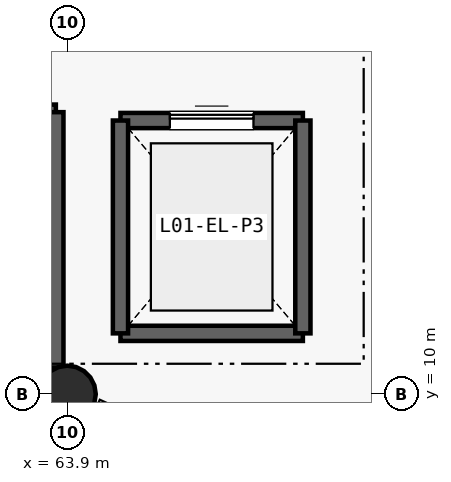
"""IFC4 building model, lengths in metres.
Left out: names, types, materials, properties, quantities, classifications, styles, units other than length and angle.
Written with IfcOpenShell. Run it as: python <this file> out.ifc"""

import sys

from ifc_helpers import new_model, si_unit, direction, frame, frame_2d, origin, origin_2d, place, context, subcontext, project, spatial, rectangle, circle, extrude, element, fill, save


model = new_model("IFC4")
c1 = context("Model", 3, precision=1e-05, world=origin(), true_north=direction((0.0, 1.0)))
c2 = subcontext(c1, "Body", "Model", "MODEL_VIEW")
j1 = project(units=[si_unit("LENGTHUNIT", "METRE"), si_unit("PLANEANGLEUNIT", "RADIAN")], contexts=[c1])
p1 = place(None, origin())
s1 = spatial("IfcSite", under=j1, at=p1, CompositionType="ELEMENT")
p2 = place(p1, origin())
s2 = spatial("IfcBuilding", under=s1, at=p2, CompositionType="ELEMENT")
p3 = place(p2, frame((0.0, 0.0, 4.2)))
s3 = spatial("IfcBuildingStorey", under=s2, at=p3, CompositionType="ELEMENT", Elevation=4.2)
p4 = place(p3, frame((63.9, 10.0, 0.0), z_axis=(0.0, 0.0, 1.0), x_axis=(1.0, 0.0, 0.0)))
e1 = element("IfcColumn", 1, at=p4, inside=s3, PredefinedType="COLUMN", context=c2, shape_type="SweptSolid", body=[
    extrude(circle(Radius=0.375, at=origin_2d()), origin(), (0.0, 0.0, 1.0), 4.2),
])
p5 = place(p3, frame((57.45, 10.35, 0.0), z_axis=(0.0, 0.0, 1.0), x_axis=(1.0, 0.0, 0.0)))
e2 = element("IfcWall", 2, at=p5, inside=s3, PredefinedType="SHEAR", context=c2, shape_type="SweptSolid", body=[
    extrude(rectangle(XDim=6.3, YDim=0.2, at=frame_2d((3.15, 0.0))), origin(), (0.0, 0.0, 1.0), 4.2),
])
p6 = place(p3, frame((57.45, 13.71, 0.0), z_axis=(0.0, 0.0, 1.0), x_axis=(1.0, 0.0, 0.0)))
e3 = element("IfcWall", 3, at=p6, inside=s3, PredefinedType="SHEAR", context=c2, shape_type="SweptSolid", body=[
    extrude(rectangle(XDim=6.3, YDim=0.2, at=frame_2d((3.15, 0.0))), origin(), (0.0, 0.0, 1.0), 4.2),
])
p7 = place(p6, frame((0.32, 0.0, 0.0)))
e4 = element("IfcOpeningElement", 4, at=p7, cuts=e3, PredefinedType="OPENING", context=c2, shape_type="SweptSolid", body=[
    extrude(rectangle(XDim=1.2, YDim=2.15, at=frame_2d((0.6, 1.075))), frame((0.0, 0.11, 0.0), z_axis=(0.0, -1.0, 0.0), x_axis=(1.0, 0.0, 0.0)), (0.0, 0.0, 1.0), 0.22),
])
p8 = place(p3, frame((63.75, 10.35, 0.0), z_axis=(0.0, 0.0, 1.0), x_axis=(0.0, 1.0, 0.0)))
e5 = element("IfcWall", 5, at=p8, inside=s3, PredefinedType="SHEAR", context=c2, shape_type="SweptSolid", body=[
    extrude(rectangle(XDim=3.36, YDim=0.2, at=frame_2d((1.68, 0.0))), origin(), (0.0, 0.0, 1.0), 4.2),
])
p9 = place(p3, frame((64.6, 10.8, 0.0), z_axis=(0.0, 0.0, 1.0), x_axis=(1.0, 0.0, 0.0)))
e6 = element("IfcWall", 6, at=p9, inside=s3, PredefinedType="SHEAR", context=c2, shape_type="SweptSolid", body=[
    extrude(rectangle(XDim=2.4, YDim=0.2, at=frame_2d((1.2, 0.0))), origin(), (0.0, 0.0, 1.0), 4.2),
])
p10 = place(p3, frame((64.6, 13.6, 0.0), z_axis=(0.0, 0.0, 1.0), x_axis=(1.0, 0.0, 0.0)))
e7 = element("IfcWall", 7, at=p10, inside=s3, PredefinedType="SHEAR", context=c2, shape_type="SweptSolid", body=[
    extrude(rectangle(XDim=2.4, YDim=0.2, at=frame_2d((1.2, 0.0))), origin(), (0.0, 0.0, 1.0), 4.2),
])
p11 = place(p10, frame((0.65, 0.0, 0.0)))
e8 = element("IfcOpeningElement", 8, at=p11, cuts=e7, PredefinedType="OPENING", context=c2, shape_type="SweptSolid", body=[
    extrude(rectangle(XDim=1.1, YDim=2.15, at=frame_2d((0.55, 1.075))), frame((0.0, 0.11, 0.0), z_axis=(0.0, -1.0, 0.0), x_axis=(1.0, 0.0, 0.0)), (0.0, 0.0, 1.0), 0.22),
])
for number, where, z_axis, x_axis in (
    (9, (64.6, 10.8, 0.0), (0.0, 0.0, 1.0), (0.0, 1.0, 0.0)),
    (10, (67.0, 10.8, 0.0), (0.0, 0.0, 1.0), (0.0, 1.0, 0.0)),
):
    element("IfcWall", number, at=place(p3, frame(where, z_axis=z_axis, x_axis=x_axis)), inside=s3, PredefinedType="SHEAR", context=c2, shape_type="SweptSolid", body=[
        extrude(rectangle(XDim=2.8, YDim=0.2, at=frame_2d((1.4, 0.0))), origin(), (0.0, 0.0, 1.0), 4.2),
    ])
p12 = place(p11, origin())
e11 = element("IfcDoor", 11, at=p12, inside=s3, OperationType="SLIDING_TO_LEFT", PredefinedType="DOOR", context=c2, shape_type="SweptSolid", body=[
    extrude(rectangle(XDim=1.1, YDim=2.15, at=frame_2d((0.55, 1.075))), frame((0.0, 0.025, 0.0), z_axis=(0.0, -1.0, 0.0), x_axis=(1.0, 0.0, 0.0)), (0.0, 0.0, 1.0), 0.05),
])
fill(e8, e11)
save(model, sys.argv[1])
